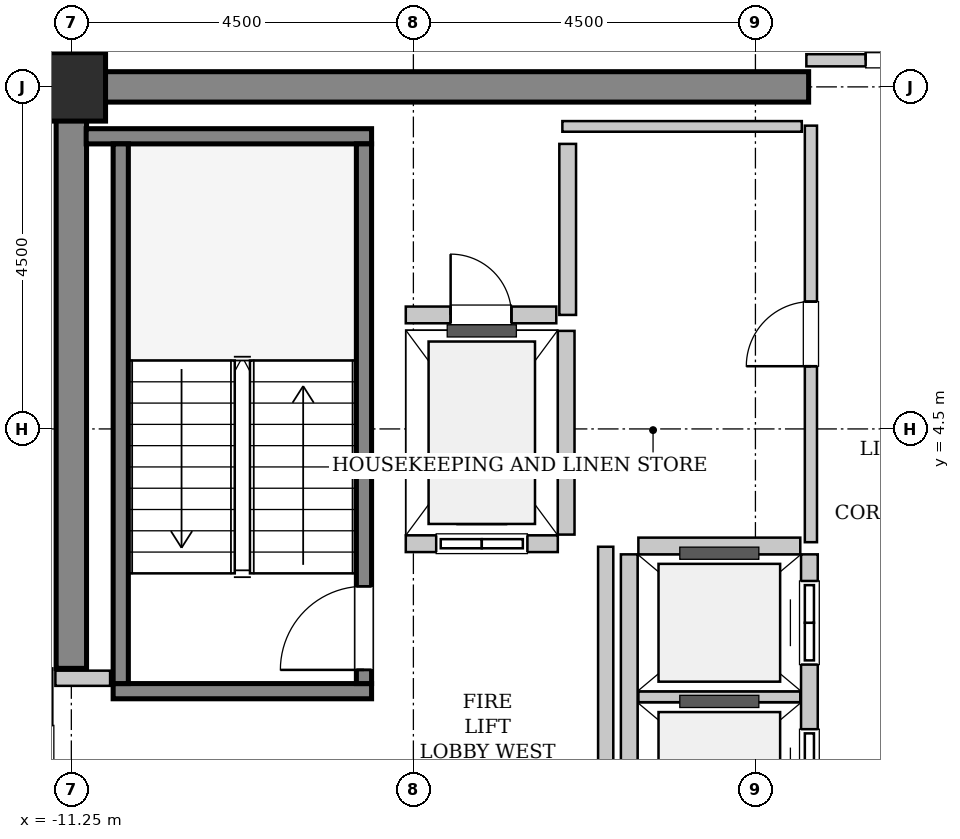
"""IFC4 building model, lengths in metres.
Left out: names, types, materials, properties, quantities, classifications, styles, units other than length and angle.
Written with IfcOpenShell. Run it as: python <this file> out.ifc"""

import sys

from ifc_helpers import new_model, si_unit, direction, frame, frame_2d, origin, origin_2d, place, context, subcontext, project, spatial, rectangle, extrude, source, transform, mapped, element, fill, save


model = new_model("IFC4")
c1 = context("Model", 3, precision=1e-05, world=origin(), true_north=direction((0.0, 1.0)))
c2 = subcontext(c1, "Body", "Model", "MODEL_VIEW")
j1 = project(units=[si_unit("LENGTHUNIT", "METRE"), si_unit("PLANEANGLEUNIT", "RADIAN")], contexts=[c1])
p1 = place(None, origin())
s1 = spatial("IfcSite", under=j1, at=p1, CompositionType="ELEMENT")
p2 = place(p1, origin())
s2 = spatial("IfcBuilding", under=s1, at=p2, CompositionType="ELEMENT")
p3 = place(p2, frame((0.0, 0.0, 337.6)))
s3 = spatial("IfcBuildingStorey", under=s2, at=p3, CompositionType="ELEMENT", Elevation=337.6)
m1 = source(origin(), c2, "Body", "SweptSolid", [
    extrude(rectangle(XDim=9.9, YDim=0.4, at=frame_2d((4.95, 0.0))), origin(), (0.0, 0.0, 1.0), 3.8),
])
p4 = place(p3, frame((-11.45, 9.0, 0.0), z_axis=(0.0, 0.0, 1.0), x_axis=(1.0, 0.0, 0.0)))
e1 = element("IfcWall", 1, at=p4, inside=s3, PredefinedType="SHEAR", context=c2, shape_type="MappedRepresentation", body=[
    mapped(m1, transform((0.0, 0.0, 0.0), x_axis=(1.0, 0.0, 0.0), y_axis=(0.0, 1.0, 0.0), z_axis=(0.0, 0.0, 1.0), scale=1.0)),
])
m2 = source(origin(), c2, "Body", "SweptSolid", [
    extrude(rectangle(XDim=7.45, YDim=0.4, at=frame_2d((3.725, 0.0))), origin(), (0.0, 0.0, 1.0), 3.8),
])
p5 = place(p3, frame((-11.25, 1.35, 0.0), z_axis=(0.0, 0.0, 1.0), x_axis=(0.0, 1.0, 0.0)))
e2 = element("IfcWall", 2, at=p5, inside=s3, PredefinedType="SHEAR", context=c2, shape_type="MappedRepresentation", body=[
    mapped(m2, transform((0.0, 0.0, 0.0), x_axis=(1.0, 0.0, 0.0), y_axis=(0.0, 1.0, 0.0), z_axis=(0.0, 0.0, 1.0), scale=1.0)),
])
m3 = source(origin(), c2, "Body", "SweptSolid", [
    extrude(rectangle(XDim=0.9, YDim=0.9, at=origin_2d()), origin(), (0.0, 0.0, 1.0), 3.8),
])
p6 = place(p3, frame((-11.25, 9.0, 0.0), z_axis=(0.0, 0.0, 1.0), x_axis=(1.0, 0.0, 0.0)))
e3 = element("IfcColumn", 3, at=p6, inside=s3, PredefinedType="COLUMN", context=c2, shape_type="MappedRepresentation", body=[
    mapped(m3, transform((0.0, 0.0, 0.0), x_axis=(1.0, 0.0, 0.0), y_axis=(0.0, 1.0, 0.0), z_axis=(0.0, 0.0, 1.0), scale=1.0)),
])
m4 = source(origin(), c2, "Body", "SweptSolid", [
    extrude(rectangle(XDim=3.4, YDim=0.2, at=frame_2d((1.7, 0.0))), origin(), (0.0, 0.0, 1.0), 3.8),
])
p7 = place(p3, frame((-7.3, 1.05, 0.0), z_axis=(0.0, 0.0, 1.0), x_axis=(-1.0, 0.0, 0.0)))
e4 = element("IfcWall", 4, at=p7, inside=s3, PredefinedType="SOLIDWALL", context=c2, shape_type="MappedRepresentation", body=[
    mapped(m4, transform((0.0, 0.0, 0.0), x_axis=(1.0, 0.0, 0.0), y_axis=(0.0, 1.0, 0.0), z_axis=(0.0, 0.0, 1.0), scale=1.0)),
])
m5 = source(origin(), c2, "Body", "SweptSolid", [
    extrude(rectangle(XDim=3.755, YDim=0.2, at=frame_2d((1.877, 0.0))), origin(), (0.0, 0.0, 1.0), 3.8),
])
p8 = place(p3, frame((-7.3, 8.35, 0.0), z_axis=(0.0, 0.0, 1.0), x_axis=(-1.0, 0.0, 0.0)))
e5 = element("IfcWall", 5, at=p8, inside=s3, PredefinedType="SOLIDWALL", context=c2, shape_type="MappedRepresentation", body=[
    mapped(m5, transform((0.0, 0.0, 0.0), x_axis=(1.0, 0.0, 0.0), y_axis=(0.0, 1.0, 0.0), z_axis=(0.0, 0.0, 1.0), scale=1.0)),
])
m6 = source(origin(), c2, "Body", "SweptSolid", [
    extrude(rectangle(XDim=7.1, YDim=0.2, at=frame_2d((3.55, 0.0))), origin(), (0.0, 0.0, 1.0), 3.8),
])
p9 = place(p3, frame((-7.4, 1.15, 0.0), z_axis=(0.0, 0.0, 1.0), x_axis=(0.0, 1.0, 0.0)))
e6 = element("IfcWall", 6, at=p9, inside=s3, PredefinedType="SOLIDWALL", context=c2, shape_type="MappedRepresentation", body=[
    mapped(m6, transform((0.0, 0.0, 0.0), x_axis=(1.0, 0.0, 0.0), y_axis=(0.0, 1.0, 0.0), z_axis=(0.0, 0.0, 1.0), scale=1.0)),
])
p10 = place(p9, frame((0.18, 0.0, 0.0)))
e7 = element("IfcOpeningElement", 7, at=p10, cuts=e6, PredefinedType="OPENING", context=c2, shape_type="SweptSolid", body=[
    extrude(rectangle(XDim=1.1, YDim=2.15, at=frame_2d((0.55, 1.075))), frame((0.0, 0.11, 0.0), z_axis=(0.0, -1.0, 0.0), x_axis=(1.0, 0.0, 0.0)), (0.0, 0.0, 1.0), 0.22),
])
p11 = place(p3, frame((-10.6, 1.15, 0.0), z_axis=(0.0, 0.0, 1.0), x_axis=(0.0, 1.0, 0.0)))
e8 = element("IfcWall", 8, at=p11, inside=s3, PredefinedType="SOLIDWALL", context=c2, shape_type="MappedRepresentation", body=[
    mapped(m6, transform((0.0, 0.0, 0.0), x_axis=(1.0, 0.0, 0.0), y_axis=(0.0, 1.0, 0.0), z_axis=(0.0, 0.0, 1.0), scale=1.0)),
])
m7 = source(origin(), c2, "Body", "SweptSolid", [
    extrude(rectangle(XDim=2.0, YDim=0.22, at=frame_2d((1.0, 0.0))), origin(), (0.0, 0.0, 1.0), 3.535),
])
p12 = place(p3, frame((-6.85, 2.99, 0.0), z_axis=(0.0, 0.0, 1.0), x_axis=(1.0, 0.0, 0.0)))
e9 = element("IfcWall", 9, at=p12, inside=s3, PredefinedType="SOLIDWALL", context=c2, shape_type="MappedRepresentation", body=[
    mapped(m7, transform((0.0, 0.0, 0.0), x_axis=(1.0, 0.0, 0.0), y_axis=(0.0, 1.0, 0.0), z_axis=(0.0, 0.0, 1.0), scale=1.0)),
])
p13 = place(p12, frame((0.4, 0.0, 0.0)))
e10 = element("IfcOpeningElement", 10, at=p13, cuts=e9, PredefinedType="OPENING", context=c2, shape_type="SweptSolid", body=[
    extrude(rectangle(XDim=1.2, YDim=2.2, at=frame_2d((0.6, 1.1))), frame((0.0, 0.12, 0.0), z_axis=(0.0, -1.0, 0.0), x_axis=(1.0, 0.0, 0.0)), (0.0, 0.0, 1.0), 0.24),
])
m8 = source(origin(), c2, "Body", "SweptSolid", [
    extrude(rectangle(XDim=2.68, YDim=0.22, at=frame_2d((1.34, 0.0))), origin(), (0.0, 0.0, 1.0), 3.535),
])
p14 = place(p3, frame((-4.74, 3.11, 0.0), z_axis=(0.0, 0.0, 1.0), x_axis=(0.0, 1.0, 0.0)))
e11 = element("IfcWall", 11, at=p14, inside=s3, PredefinedType="SOLIDWALL", context=c2, shape_type="MappedRepresentation", body=[
    mapped(m8, transform((0.0, 0.0, 0.0), x_axis=(1.0, 0.0, 0.0), y_axis=(0.0, 1.0, 0.0), z_axis=(0.0, 0.0, 1.0), scale=1.0)),
])
m9 = source(origin(), c2, "Body", "SweptSolid", [
    extrude(rectangle(XDim=5.7, YDim=0.22, at=frame_2d((2.85, 0.0))), origin(), (0.0, 0.0, 1.0), 3.535),
])
p15 = place(p3, frame((-1.54, -2.85, 0.0), z_axis=(0.0, 0.0, 1.0), x_axis=(0.0, 1.0, 0.0)))
e12 = element("IfcWall", 12, at=p15, inside=s3, PredefinedType="SOLIDWALL", context=c2, shape_type="MappedRepresentation", body=[
    mapped(m9, transform((0.0, 0.0, 0.0), x_axis=(1.0, 0.0, 0.0), y_axis=(0.0, 1.0, 0.0), z_axis=(0.0, 0.0, 1.0), scale=1.0)),
])
p16 = place(p15, frame((0.35, 0.0, 0.0)))
e13 = element("IfcOpeningElement", 13, at=p16, cuts=e12, PredefinedType="OPENING", context=c2, shape_type="SweptSolid", body=[
    extrude(rectangle(XDim=1.1, YDim=2.2, at=frame_2d((0.55, 1.1))), frame((0.0, 0.12, 0.0), z_axis=(0.0, -1.0, 0.0), x_axis=(1.0, 0.0, 0.0)), (0.0, 0.0, 1.0), 0.24),
])
p17 = place(p15, frame((2.3, 0.0, 0.0)))
e14 = element("IfcOpeningElement", 14, at=p17, cuts=e12, PredefinedType="OPENING", context=c2, shape_type="SweptSolid", body=[
    extrude(rectangle(XDim=1.1, YDim=2.2, at=frame_2d((0.55, 1.1))), frame((0.0, 0.12, 0.0), z_axis=(0.0, -1.0, 0.0), x_axis=(1.0, 0.0, 0.0)), (0.0, 0.0, 1.0), 0.24),
])
p18 = place(p15, frame((4.25, 0.0, 0.0)))
e15 = element("IfcOpeningElement", 15, at=p18, cuts=e12, PredefinedType="OPENING", context=c2, shape_type="SweptSolid", body=[
    extrude(rectangle(XDim=1.1, YDim=2.2, at=frame_2d((0.55, 1.1))), frame((0.0, 0.12, 0.0), z_axis=(0.0, -1.0, 0.0), x_axis=(1.0, 0.0, 0.0)), (0.0, 0.0, 1.0), 0.24),
])
p19 = place(p3, frame((-3.91, 2.85, 0.0), z_axis=(0.0, 0.0, 1.0), x_axis=(0.0, -1.0, 0.0)))
e16 = element("IfcWall", 16, at=p19, inside=s3, PredefinedType="SOLIDWALL", context=c2, shape_type="MappedRepresentation", body=[
    mapped(m9, transform((0.0, 0.0, 0.0), x_axis=(1.0, 0.0, 0.0), y_axis=(0.0, 1.0, 0.0), z_axis=(0.0, 0.0, 1.0), scale=1.0)),
])
m10 = source(origin(), c2, "Body", "SweptSolid", [
    extrude(rectangle(XDim=2.13, YDim=0.14, at=frame_2d((1.065, 0.0))), origin(), (0.0, 0.0, 1.0), 3.535),
])
p20 = place(p3, frame((-3.79, 0.975, 0.0), z_axis=(0.0, 0.0, 1.0), x_axis=(1.0, 0.0, 0.0)))
e17 = element("IfcWall", 17, at=p20, inside=s3, PredefinedType="PARTITIONING", context=c2, shape_type="MappedRepresentation", body=[
    mapped(m10, transform((0.0, 0.0, 0.0), x_axis=(1.0, 0.0, 0.0), y_axis=(0.0, 1.0, 0.0), z_axis=(0.0, 0.0, 1.0), scale=1.0)),
])
m11 = source(origin(), c2, "Body", "SweptSolid", [
    extrude(rectangle(XDim=2.13, YDim=0.22, at=frame_2d((1.065, 0.0))), origin(), (0.0, 0.0, 1.0), 3.535),
])
p21 = place(p3, frame((-1.66, 2.96, 0.0), z_axis=(0.0, 0.0, 1.0), x_axis=(-1.0, 0.0, 0.0)))
e18 = element("IfcWall", 18, at=p21, inside=s3, PredefinedType="SOLIDWALL", context=c2, shape_type="MappedRepresentation", body=[
    mapped(m11, transform((0.0, 0.0, 0.0), x_axis=(1.0, 0.0, 0.0), y_axis=(0.0, 1.0, 0.0), z_axis=(0.0, 0.0, 1.0), scale=1.0)),
])
m12 = source(origin(), c2, "Body", "SweptSolid", [
    extrude(rectangle(XDim=2.25, YDim=0.22, at=frame_2d((1.125, 0.0))), origin(), (0.0, 0.0, 1.0), 3.535),
])
p22 = place(p3, frame((-4.72, 6.0, 0.0), z_axis=(0.0, 0.0, 1.0), x_axis=(0.0, 1.0, 0.0)))
e19 = element("IfcWall", 19, at=p22, inside=s3, PredefinedType="SOLIDWALL", context=c2, shape_type="MappedRepresentation", body=[
    mapped(m12, transform((0.0, 0.0, 0.0), x_axis=(1.0, 0.0, 0.0), y_axis=(0.0, 1.0, 0.0), z_axis=(0.0, 0.0, 1.0), scale=1.0)),
])
m13 = source(origin(), c2, "Body", "SweptSolid", [
    extrude(rectangle(XDim=1.98, YDim=0.22, at=frame_2d((0.99, 0.0))), origin(), (0.0, 0.0, 1.0), 3.535),
])
p23 = place(p3, frame((-6.85, 6.0, 0.0), z_axis=(0.0, 0.0, 1.0), x_axis=(1.0, 0.0, 0.0)))
e20 = element("IfcWall", 20, at=p23, inside=s3, PredefinedType="SOLIDWALL", context=c2, shape_type="MappedRepresentation", body=[
    mapped(m13, transform((0.0, 0.0, 0.0), x_axis=(1.0, 0.0, 0.0), y_axis=(0.0, 1.0, 0.0), z_axis=(0.0, 0.0, 1.0), scale=1.0)),
])
p24 = place(p23, frame((0.59, 0.0, 0.0)))
e21 = element("IfcOpeningElement", 21, at=p24, cuts=e20, PredefinedType="OPENING", context=c2, shape_type="SweptSolid", body=[
    extrude(rectangle(XDim=0.8, YDim=2.0, at=frame_2d((0.4, 1.0))), frame((0.0, 0.12, 0.0), z_axis=(0.0, -1.0, 0.0), x_axis=(1.0, 0.0, 0.0)), (0.0, 0.0, 1.0), 0.24),
])
m14 = source(origin(), c2, "Body", "SweptSolid", [
    extrude(rectangle(XDim=5.9, YDim=0.2, at=frame_2d((2.95, 0.0))), origin(), (0.0, 0.0, 1.0), 3.535),
])
p25 = place(p3, frame((-4.22, -2.95, 0.0), z_axis=(0.0, 0.0, 1.0), x_axis=(0.0, 1.0, 0.0)))
e22 = element("IfcWall", 22, at=p25, inside=s3, PredefinedType="PARTITIONING", context=c2, shape_type="MappedRepresentation", body=[
    mapped(m14, transform((0.0, 0.0, 0.0), x_axis=(1.0, 0.0, 0.0), y_axis=(0.0, 1.0, 0.0), z_axis=(0.0, 0.0, 1.0), scale=1.0)),
])
m15 = source(origin(), c2, "Body", "SweptSolid", [
    extrude(rectangle(XDim=0.72, YDim=0.2, at=frame_2d((0.36, 0.0))), origin(), (0.0, 0.0, 1.0), 3.535),
])
p26 = place(p3, frame((-11.46, 1.22, 0.0), z_axis=(0.0, 0.0, 1.0), x_axis=(1.0, 0.0, 0.0)))
e23 = element("IfcWall", 23, at=p26, inside=s3, PredefinedType="PARTITIONING", context=c2, shape_type="MappedRepresentation", body=[
    mapped(m15, transform((0.0, 0.0, 0.0), x_axis=(1.0, 0.0, 0.0), y_axis=(0.0, 1.0, 0.0), z_axis=(0.0, 0.0, 1.0), scale=1.0)),
])
m16 = source(origin(), c2, "Body", "SweptSolid", [
    extrude(rectangle(XDim=3.16, YDim=0.16, at=frame_2d((1.58, 0.0))), origin(), (0.0, 0.0, 1.0), 2.625),
])
p27 = place(p3, frame((-1.58, 9.35, 0.0), z_axis=(0.0, 0.0, 1.0), x_axis=(1.0, 0.0, 0.0)))
e24 = element("IfcWall", 24, at=p27, inside=s3, PredefinedType="PARTITIONING", context=c2, shape_type="MappedRepresentation", body=[
    mapped(m16, transform((0.0, 0.0, 0.0), x_axis=(1.0, 0.0, 0.0), y_axis=(0.0, 1.0, 0.0), z_axis=(0.0, 0.0, 1.0), scale=1.0)),
])
p28 = place(p27, frame((0.78, 0.0, 0.0)))
e25 = element("IfcOpeningElement", 25, at=p28, cuts=e24, PredefinedType="OPENING", context=c2, shape_type="SweptSolid", body=[
    extrude(rectangle(XDim=1.6, YDim=2.3, at=frame_2d((0.8, 1.15))), frame((0.0, 0.09, 0.0), z_axis=(0.0, -1.0, 0.0), x_axis=(1.0, 0.0, 0.0)), (0.0, 0.0, 1.0), 0.18),
])
m17 = source(origin(), c2, "Body", "SweptSolid", [
    extrude(rectangle(XDim=5.48, YDim=0.16, at=frame_2d((2.74, 0.0))), origin(), (0.0, 0.0, 1.0), 3.535),
])
p29 = place(p3, frame((-1.52, 3.01, 0.0), z_axis=(0.0, 0.0, 1.0), x_axis=(0.0, 1.0, 0.0)))
e26 = element("IfcWall", 26, at=p29, inside=s3, PredefinedType="PARTITIONING", context=c2, shape_type="MappedRepresentation", body=[
    mapped(m17, transform((0.0, 0.0, 0.0), x_axis=(1.0, 0.0, 0.0), y_axis=(0.0, 1.0, 0.0), z_axis=(0.0, 0.0, 1.0), scale=1.0)),
])
p30 = place(p29, frame((2.315, 0.0, 0.0)))
e27 = element("IfcOpeningElement", 27, at=p30, cuts=e26, PredefinedType="OPENING", context=c2, shape_type="SweptSolid", body=[
    extrude(rectangle(XDim=0.85, YDim=2.1, at=frame_2d((0.425, 1.05))), frame((0.0, 0.09, 0.0), z_axis=(0.0, -1.0, 0.0), x_axis=(1.0, 0.0, 0.0)), (0.0, 0.0, 1.0), 0.18),
])
m18 = source(origin(), c2, "Body", "SweptSolid", [
    extrude(rectangle(XDim=3.15, YDim=0.14, at=frame_2d((1.575, 0.0))), origin(), (0.0, 0.0, 1.0), 3.535),
])
p31 = place(p3, frame((-4.79, 8.48, 0.0), z_axis=(0.0, 0.0, 1.0), x_axis=(1.0, 0.0, 0.0)))
e28 = element("IfcWall", 28, at=p31, inside=s3, PredefinedType="PARTITIONING", context=c2, shape_type="MappedRepresentation", body=[
    mapped(m18, transform((0.0, 0.0, 0.0), x_axis=(1.0, 0.0, 0.0), y_axis=(0.0, 1.0, 0.0), z_axis=(0.0, 0.0, 1.0), scale=1.0)),
])
m19 = source(origin(), c2, "Body", "SweptSolid", [
    extrude(rectangle(XDim=1.1, YDim=2.15, at=frame_2d((0.55, 1.075))), frame((0.0, 0.025, 0.0), z_axis=(0.0, -1.0, 0.0), x_axis=(1.0, 0.0, 0.0)), (0.0, 0.0, 1.0), 0.05),
])
p32 = place(p10, origin())
e29 = element("IfcDoor", 29, at=p32, inside=s3, OperationType="SINGLE_SWING_LEFT", PredefinedType="DOOR", context=c2, shape_type="MappedRepresentation", body=[
    mapped(m19, transform((0.0, 0.0, 0.0), x_axis=(1.0, 0.0, 0.0), y_axis=(0.0, 1.0, 0.0), z_axis=(0.0, 0.0, 1.0), scale=1.0)),
])
fill(e7, e29)
m20 = source(origin(), c2, "Body", "SweptSolid", [
    extrude(rectangle(XDim=1.2, YDim=2.2, at=frame_2d((0.6, 1.1))), frame((0.0, 0.025, 0.0), z_axis=(0.0, -1.0, 0.0), x_axis=(1.0, 0.0, 0.0)), (0.0, 0.0, 1.0), 0.05),
])
p33 = place(p13, origin())
e30 = element("IfcDoor", 30, at=p33, inside=s3, OperationType="SLIDING_TO_LEFT", PredefinedType="DOOR", context=c2, shape_type="MappedRepresentation", body=[
    mapped(m20, transform((0.0, 0.0, 0.0), x_axis=(1.0, 0.0, 0.0), y_axis=(0.0, 1.0, 0.0), z_axis=(0.0, 0.0, 1.0), scale=1.0)),
])
fill(e10, e30)
m21 = source(origin(), c2, "Body", "SweptSolid", [
    extrude(rectangle(XDim=1.1, YDim=2.2, at=frame_2d((0.55, 1.1))), frame((0.0, 0.025, 0.0), z_axis=(0.0, -1.0, 0.0), x_axis=(1.0, 0.0, 0.0)), (0.0, 0.0, 1.0), 0.05),
])
p34 = place(p17, origin())
e31 = element("IfcDoor", 31, at=p34, inside=s3, OperationType="DOUBLE_DOOR_SLIDING", PredefinedType="DOOR", context=c2, shape_type="MappedRepresentation", body=[
    mapped(m21, transform((0.0, 0.0, 0.0), x_axis=(1.0, 0.0, 0.0), y_axis=(0.0, 1.0, 0.0), z_axis=(0.0, 0.0, 1.0), scale=1.0)),
])
fill(e14, e31)
p35 = place(p18, origin())
e32 = element("IfcDoor", 32, at=p35, inside=s3, OperationType="DOUBLE_DOOR_SLIDING", PredefinedType="DOOR", context=c2, shape_type="MappedRepresentation", body=[
    mapped(m21, transform((0.0, 0.0, 0.0), x_axis=(1.0, 0.0, 0.0), y_axis=(0.0, 1.0, 0.0), z_axis=(0.0, 0.0, 1.0), scale=1.0)),
])
fill(e15, e32)
m22 = source(origin(), c2, "Body", "SweptSolid", [
    extrude(rectangle(XDim=0.8, YDim=2.0, at=frame_2d((0.4, 1.0))), frame((0.0, 0.025, 0.0), z_axis=(0.0, -1.0, 0.0), x_axis=(1.0, 0.0, 0.0)), (0.0, 0.0, 1.0), 0.05),
])
p36 = place(p24, origin())
e33 = element("IfcDoor", 33, at=p36, inside=s3, OperationType="SINGLE_SWING_LEFT", PredefinedType="TRAPDOOR", context=c2, shape_type="MappedRepresentation", body=[
    mapped(m22, transform((0.0, 0.0, 0.0), x_axis=(1.0, 0.0, 0.0), y_axis=(0.0, 1.0, 0.0), z_axis=(0.0, 0.0, 1.0), scale=1.0)),
])
fill(e21, e33)
m23 = source(origin(), c2, "Body", "SweptSolid", [
    extrude(rectangle(XDim=1.6, YDim=2.3, at=frame_2d((0.8, 1.15))), frame((0.0, 0.025, 0.0), z_axis=(0.0, -1.0, 0.0), x_axis=(1.0, 0.0, 0.0)), (0.0, 0.0, 1.0), 0.05),
])
p37 = place(p28, origin())
e34 = element("IfcDoor", 34, at=p37, inside=s3, OperationType="DOUBLE_DOOR_SINGLE_SWING", PredefinedType="DOOR", context=c2, shape_type="MappedRepresentation", body=[
    mapped(m23, transform((0.0, 0.0, 0.0), x_axis=(1.0, 0.0, 0.0), y_axis=(0.0, 1.0, 0.0), z_axis=(0.0, 0.0, 1.0), scale=1.0)),
])
fill(e25, e34)
m24 = source(origin(), c2, "Body", "SweptSolid", [
    extrude(rectangle(XDim=0.85, YDim=2.1, at=frame_2d((0.425, 1.05))), frame((0.0, 0.025, 0.0), z_axis=(0.0, -1.0, 0.0), x_axis=(1.0, 0.0, 0.0)), (0.0, 0.0, 1.0), 0.05),
])
p38 = place(p30, origin())
e35 = element("IfcDoor", 35, at=p38, inside=s3, OperationType="SINGLE_SWING_LEFT", PredefinedType="DOOR", context=c2, shape_type="MappedRepresentation", body=[
    mapped(m24, transform((0.0, 0.0, 0.0), x_axis=(1.0, 0.0, 0.0), y_axis=(0.0, 1.0, 0.0), z_axis=(0.0, 0.0, 1.0), scale=1.0)),
])
fill(e27, e35)
save(model, sys.argv[1])
